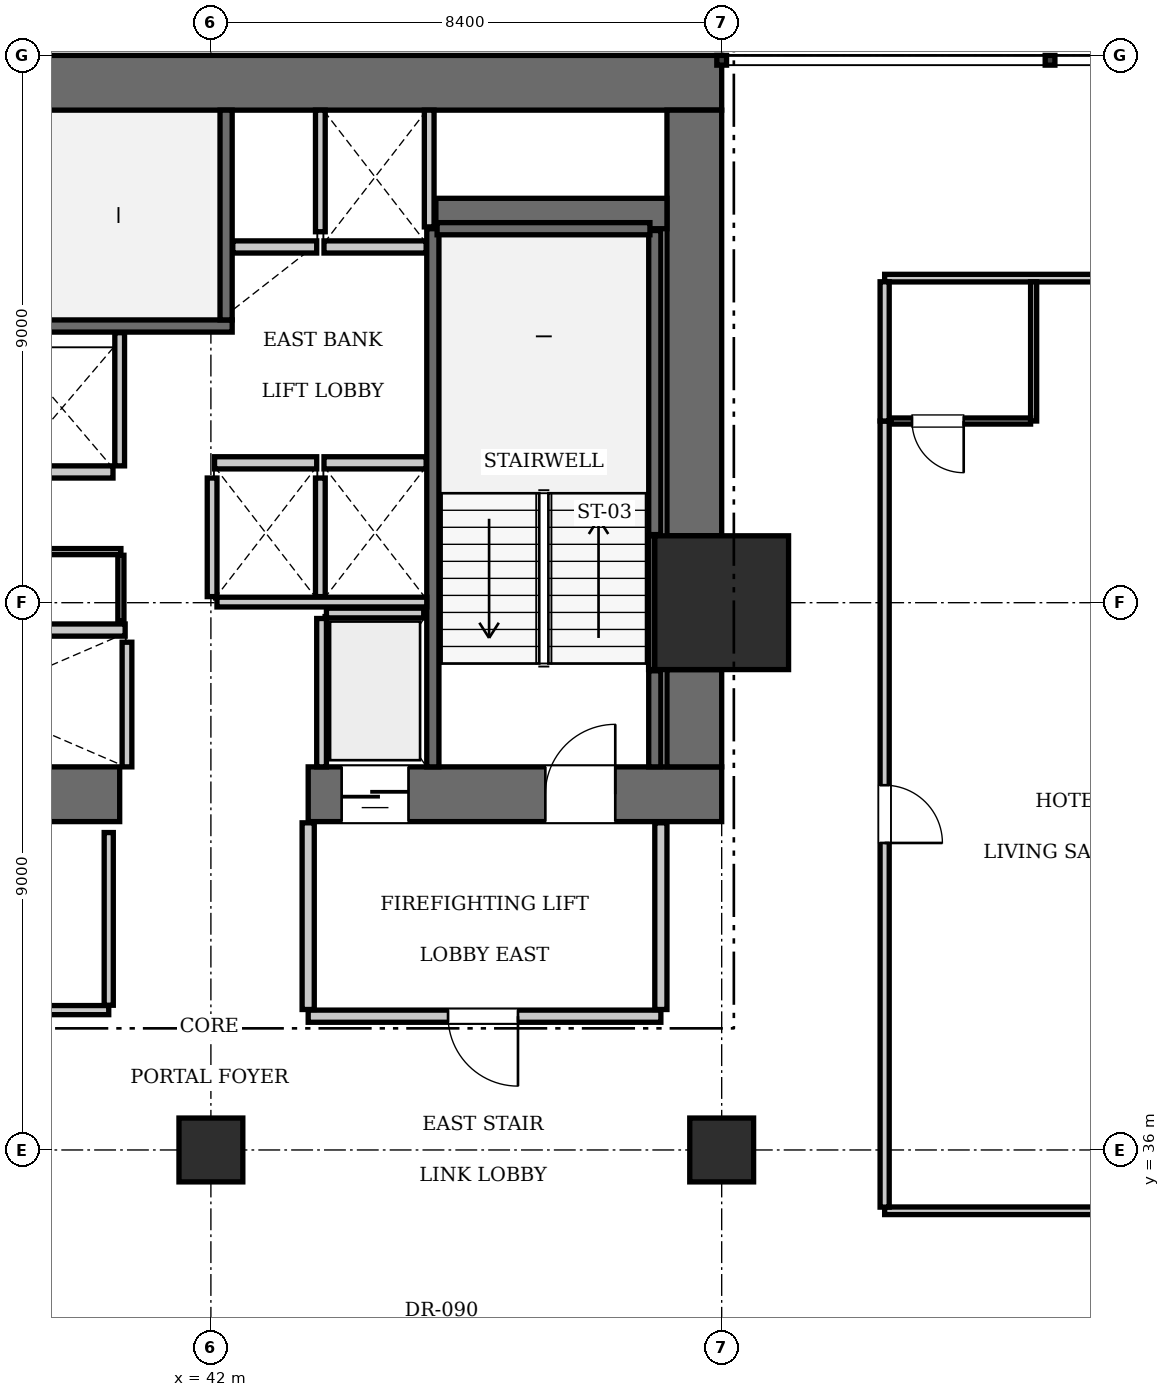
"""IFC4 building model, lengths in metres.
Left out: names, types, materials, properties, quantities, classifications, styles, units other than length and angle.
Written with IfcOpenShell. Run it as: python <this file> out.ifc"""

import sys

from ifc_helpers import new_model, si_unit, direction, frame, frame_2d, origin, origin_2d, place, context, subcontext, project, spatial, rectangle, extrude, element, fill, save


model = new_model("IFC4")
c1 = context("Model", 3, precision=1e-05, world=origin(), true_north=direction((0.0, 1.0)))
c2 = subcontext(c1, "Body", "Model", "MODEL_VIEW")
j1 = project(units=[si_unit("LENGTHUNIT", "METRE"), si_unit("PLANEANGLEUNIT", "RADIAN")], contexts=[c1])
p1 = place(None, origin())
s1 = spatial("IfcSite", under=j1, at=p1, CompositionType="ELEMENT")
p2 = place(p1, origin())
s2 = spatial("IfcBuilding", under=s1, at=p2, CompositionType="ELEMENT")
p3 = place(p2, frame((0.0, 0.0, 111.65)))
s3 = spatial("IfcBuildingStorey", under=s2, at=p3, CompositionType="ELEMENT", Elevation=111.65)
p4 = place(p3, frame((50.4, 45.0, 0.0), z_axis=(0.0, 0.0, 1.0), x_axis=(1.0, 0.0, 0.0)))
e1 = element("IfcColumn", 1, at=p4, inside=s3, PredefinedType="COLUMN", context=c2, shape_type="SweptSolid", body=[
    extrude(rectangle(XDim=2.2, YDim=2.2, at=origin_2d()), origin(), (0.0, 0.0, 1.0), 3.85),
])
p5 = place(p3, frame((25.2, 53.55, 0.0), z_axis=(0.0, 0.0, 1.0), x_axis=(1.0, 0.0, 0.0)))
e2 = element("IfcWall", 2, at=p5, inside=s3, PredefinedType="SHEAR", context=c2, shape_type="SweptSolid", body=[
    extrude(rectangle(XDim=25.2, YDim=0.9, at=frame_2d((12.6, 0.0))), origin(), (0.0, 0.0, 1.0), 3.85),
])
p6 = place(p3, frame((35.1, 41.85, 0.0), z_axis=(0.0, 0.0, 1.0), x_axis=(1.0, 0.0, 0.0)))
e3 = element("IfcWall", 3, at=p6, inside=s3, PredefinedType="SHEAR", context=c2, shape_type="SweptSolid", body=[
    extrude(rectangle(XDim=5.4, YDim=0.9, at=frame_2d((2.7, 0.0))), origin(), (0.0, 0.0, 1.0), 3.85),
])
p7 = place(p3, frame((43.6, 41.85, 0.0), z_axis=(0.0, 0.0, 1.0), x_axis=(1.0, 0.0, 0.0)))
e4 = element("IfcWall", 4, at=p7, inside=s3, PredefinedType="SHEAR", context=c2, shape_type="SweptSolid", body=[
    extrude(rectangle(XDim=6.8, YDim=0.9, at=frame_2d((3.4, 0.0))), origin(), (0.0, 0.0, 1.0), 3.85),
])
p8 = place(p7, frame((3.9, 0.0, 0.0)))
e5 = element("IfcOpeningElement", 5, at=p8, cuts=e4, PredefinedType="OPENING", context=c2, shape_type="SweptSolid", body=[
    extrude(rectangle(XDim=1.15, YDim=2.15, at=frame_2d((0.575, 1.075))), frame((0.0, 0.46, 0.0), z_axis=(0.0, -1.0, 0.0), x_axis=(1.0, 0.0, 0.0)), (0.0, 0.0, 1.0), 0.92),
])
p9 = place(p7, frame((0.55, 0.0, 0.0)))
e6 = element("IfcOpeningElement", 6, at=p9, cuts=e4, PredefinedType="OPENING", context=c2, shape_type="SweptSolid", body=[
    extrude(rectangle(XDim=1.1, YDim=2.2, at=frame_2d((0.55, 1.1))), frame((0.0, 0.46, 0.0), z_axis=(0.0, -1.0, 0.0), x_axis=(1.0, 0.0, 0.0)), (0.0, 0.0, 1.0), 0.92),
])
p10 = place(p3, frame((49.95, 42.3, 0.0), z_axis=(0.0, 0.0, 1.0), x_axis=(0.0, 1.0, 0.0)))
e7 = element("IfcWall", 7, at=p10, inside=s3, PredefinedType="SHEAR", context=c2, shape_type="SweptSolid", body=[
    extrude(rectangle(XDim=1.6, YDim=0.9, at=frame_2d((0.8, 0.0))), origin(), (0.0, 0.0, 1.0), 3.85),
])
p11 = place(p3, frame((49.95, 46.1, 0.0), z_axis=(0.0, 0.0, 1.0), x_axis=(0.0, 1.0, 0.0)))
e8 = element("IfcWall", 8, at=p11, inside=s3, PredefinedType="SHEAR", context=c2, shape_type="SweptSolid", body=[
    extrude(rectangle(XDim=7.0, YDim=0.9, at=frame_2d((3.5, 0.0))), origin(), (0.0, 0.0, 1.0), 3.85),
])
p12 = place(p3, frame((45.7, 51.4, 0.0), z_axis=(0.0, 0.0, 1.0), x_axis=(1.0, 0.0, 0.0)))
e9 = element("IfcWall", 9, at=p12, inside=s3, PredefinedType="SHEAR", context=c2, shape_type="SweptSolid", body=[
    extrude(rectangle(XDim=3.8, YDim=0.5, at=frame_2d((1.9, 0.0))), origin(), (0.0, 0.0, 1.0), 3.85),
])
for number, where, z_axis, x_axis in (
    (10, (42.0, 36.0, 0.0), (0.0, 0.0, 1.0), (1.0, 0.0, 0.0)),
    (11, (50.4, 36.0, 0.0), (0.0, 0.0, 1.0), (1.0, 0.0, 0.0)),
):
    element("IfcColumn", number, at=place(p3, frame(where, z_axis=z_axis, x_axis=x_axis)), inside=s3, PredefinedType="COLUMN", context=c2, shape_type="SweptSolid", body=[
        extrude(rectangle(XDim=1.05, YDim=1.05, at=origin_2d()), origin(), (0.0, 0.0, 1.0), 3.85),
    ])
p13 = place(p3, frame((33.25, 49.55, 0.0), z_axis=(0.0, 0.0, 1.0), x_axis=(1.0, 0.0, 0.0)))
e12 = element("IfcWall", 12, at=p13, inside=s3, PredefinedType="SOLIDWALL", context=c2, shape_type="SweptSolid", body=[
    extrude(rectangle(XDim=9.1, YDim=0.2, at=frame_2d((4.55, 0.0))), origin(), (0.0, 0.0, 1.0), 3.55),
])
p14 = place(p3, frame((42.25, 49.65, 0.0), z_axis=(0.0, 0.0, 1.0), x_axis=(0.0, 1.0, 0.0)))
e13 = element("IfcWall", 13, at=p14, inside=s3, PredefinedType="SOLIDWALL", context=c2, shape_type="SweptSolid", body=[
    extrude(rectangle(XDim=3.45, YDim=0.2, at=frame_2d((1.725, 0.0))), origin(), (0.0, 0.0, 1.0), 3.55),
])
p15 = place(p3, frame((45.65, 42.3, 0.0), z_axis=(0.0, 0.0, 1.0), x_axis=(0.0, 1.0, 0.0)))
e14 = element("IfcWall", 14, at=p15, inside=s3, PredefinedType="SOLIDWALL", context=c2, shape_type="SweptSolid", body=[
    extrude(rectangle(XDim=8.85, YDim=0.2, at=frame_2d((4.425, 0.0))), origin(), (0.0, 0.0, 1.0), 3.55),
])
p16 = place(p3, frame((49.3, 42.3, 0.0), z_axis=(0.0, 0.0, 1.0), x_axis=(0.0, 1.0, 0.0)))
e15 = element("IfcWall", 15, at=p16, inside=s3, PredefinedType="SOLIDWALL", context=c2, shape_type="SweptSolid", body=[
    extrude(rectangle(XDim=1.58, YDim=0.2, at=frame_2d((0.79, 0.0))), origin(), (0.0, 0.0, 1.0), 3.55),
])
p17 = place(p3, frame((49.3, 46.12, 0.0), z_axis=(0.0, 0.0, 1.0), x_axis=(0.0, 1.0, 0.0)))
e16 = element("IfcWall", 16, at=p17, inside=s3, PredefinedType="SOLIDWALL", context=c2, shape_type="SweptSolid", body=[
    extrude(rectangle(XDim=5.0, YDim=0.2, at=frame_2d((2.5, 0.0))), origin(), (0.0, 0.0, 1.0), 3.55),
])
p18 = place(p3, frame((45.72, 51.15, 0.0), z_axis=(0.0, 0.0, 1.0), x_axis=(1.0, 0.0, 0.0)))
e17 = element("IfcWall", 17, at=p18, inside=s3, PredefinedType="SOLIDWALL", context=c2, shape_type="SweptSolid", body=[
    extrude(rectangle(XDim=3.5, YDim=0.2, at=frame_2d((1.75, 0.0))), origin(), (0.0, 0.0, 1.0), 3.55),
])
p19 = place(p3, frame((49.248, 43.9, 0.0), z_axis=(0.0, 0.0, 1.0), x_axis=(0.0, 1.0, 0.0)))
e18 = element("IfcWall", 18, at=p19, inside=s3, PredefinedType="SOLIDWALL", context=c2, shape_type="SweptSolid", body=[
    extrude(rectangle(XDim=2.2, YDim=0.1, at=frame_2d((1.1, 0.0))), origin(), (0.0, 0.0, 1.0), 3.55),
])
for number, where, z_axis, x_axis in (
    (19, (42.06, 47.3, 0.0), (0.0, 0.0, 1.0), (1.0, 0.0, 0.0)),
    (20, (43.86, 47.3, 0.0), (0.0, 0.0, 1.0), (1.0, 0.0, 0.0)),
):
    element("IfcWall", number, at=place(p3, frame(where, z_axis=z_axis, x_axis=x_axis)), inside=s3, PredefinedType="SOLIDWALL", context=c2, shape_type="SweptSolid", body=[
        extrude(rectangle(XDim=1.68, YDim=0.2, at=frame_2d((0.84, 0.0))), origin(), (0.0, 0.0, 1.0), 3.55),
    ])
p20 = place(p3, frame((42.36, 50.85, 0.0), z_axis=(0.0, 0.0, 1.0), x_axis=(1.0, 0.0, 0.0)))
e21 = element("IfcWall", 21, at=p20, inside=s3, PredefinedType="SOLIDWALL", context=c2, shape_type="SweptSolid", body=[
    extrude(rectangle(XDim=1.38, YDim=0.2, at=frame_2d((0.69, 0.0))), origin(), (0.0, 0.0, 1.0), 3.55),
])
p21 = place(p3, frame((43.86, 50.85, 0.0), z_axis=(0.0, 0.0, 1.0), x_axis=(1.0, 0.0, 0.0)))
e22 = element("IfcWall", 22, at=p21, inside=s3, PredefinedType="SOLIDWALL", context=c2, shape_type="SweptSolid", body=[
    extrude(rectangle(XDim=1.68, YDim=0.2, at=frame_2d((0.84, 0.0))), origin(), (0.0, 0.0, 1.0), 3.55),
])
p22 = place(p3, frame((38.91, 44.55, 0.0), z_axis=(0.0, 0.0, 1.0), x_axis=(1.0, 0.0, 0.0)))
e23 = element("IfcWall", 23, at=p22, inside=s3, PredefinedType="SOLIDWALL", context=c2, shape_type="SweptSolid", body=[
    extrude(rectangle(XDim=1.68, YDim=0.2, at=frame_2d((0.84, 0.0))), origin(), (0.0, 0.0, 1.0), 3.55),
])
p23 = place(p3, frame((38.71, 47.15, 0.0), z_axis=(0.0, 0.0, 1.0), x_axis=(1.0, 0.0, 0.0)))
e24 = element("IfcWall", 24, at=p23, inside=s3, PredefinedType="SOLIDWALL", context=c2, shape_type="SweptSolid", body=[
    extrude(rectangle(XDim=1.68, YDim=0.2, at=frame_2d((0.84, 0.0))), origin(), (0.0, 0.0, 1.0), 3.55),
])
p24 = place(p3, frame((43.9, 44.83, 0.0), z_axis=(0.0, 0.0, 1.0), x_axis=(1.0, 0.0, 0.0)))
e25 = element("IfcWall", 25, at=p24, inside=s3, PredefinedType="SOLIDWALL", context=c2, shape_type="SweptSolid", body=[
    extrude(rectangle(XDim=1.6, YDim=0.16, at=frame_2d((0.8, 0.0))), origin(), (0.0, 0.0, 1.0), 3.55),
])
p25 = place(p3, frame((43.82, 42.3, 0.0), z_axis=(0.0, 0.0, 1.0), x_axis=(0.0, 1.0, 0.0)))
e26 = element("IfcWall", 26, at=p25, inside=s3, PredefinedType="SOLIDWALL", context=c2, shape_type="SweptSolid", body=[
    extrude(rectangle(XDim=2.44, YDim=0.16, at=frame_2d((1.22, 0.0))), origin(), (0.0, 0.0, 1.0), 3.55),
])
for number, where, z_axis, x_axis in (
    (27, (42.02, 45.1, 0.0), (0.0, 0.0, 1.0), (0.0, 1.0, 0.0)),
    (28, (43.8, 45.1, 0.0), (0.0, 0.0, 1.0), (0.0, 1.0, 0.0)),
):
    element("IfcWall", number, at=place(p3, frame(where, z_axis=z_axis, x_axis=x_axis)), inside=s3, PredefinedType="SOLIDWALL", context=c2, shape_type="SweptSolid", body=[
        extrude(rectangle(XDim=1.95, YDim=0.16, at=frame_2d((0.975, 0.0))), origin(), (0.0, 0.0, 1.0), 3.55),
    ])
p26 = place(p3, frame((42.1, 45.01, 0.0), z_axis=(0.0, 0.0, 1.0), x_axis=(1.0, 0.0, 0.0)))
e29 = element("IfcWall", 29, at=p26, inside=s3, PredefinedType="SOLIDWALL", context=c2, shape_type="SweptSolid", body=[
    extrude(rectangle(XDim=3.45, YDim=0.16, at=frame_2d((1.725, 0.0))), origin(), (0.0, 0.0, 1.0), 3.55),
])
p27 = place(p3, frame((45.59, 51.18, 0.0), z_axis=(0.0, 0.0, 1.0), x_axis=(0.0, 1.0, 0.0)))
e30 = element("IfcWall", 30, at=p27, inside=s3, PredefinedType="SOLIDWALL", context=c2, shape_type="SweptSolid", body=[
    extrude(rectangle(XDim=1.92, YDim=0.16, at=frame_2d((0.96, 0.0))), origin(), (0.0, 0.0, 1.0), 3.55),
])
p28 = place(p3, frame((43.8, 51.1, 0.0), z_axis=(0.0, 0.0, 1.0), x_axis=(0.0, 1.0, 0.0)))
e31 = element("IfcWall", 31, at=p28, inside=s3, PredefinedType="SOLIDWALL", context=c2, shape_type="SweptSolid", body=[
    extrude(rectangle(XDim=2.0, YDim=0.16, at=frame_2d((1.0, 0.0))), origin(), (0.0, 0.0, 1.0), 3.55),
])
p29 = place(p3, frame((40.62, 42.3, 0.0), z_axis=(0.0, 0.0, 1.0), x_axis=(0.0, 1.0, 0.0)))
e32 = element("IfcWall", 32, at=p29, inside=s3, PredefinedType="SOLIDWALL", context=c2, shape_type="SweptSolid", body=[
    extrude(rectangle(XDim=2.05, YDim=0.16, at=frame_2d((1.025, 0.0))), origin(), (0.0, 0.0, 1.0), 3.55),
])
p30 = place(p3, frame((40.5, 47.25, 0.0), z_axis=(0.0, 0.0, 1.0), x_axis=(0.0, 1.0, 0.0)))
e33 = element("IfcWall", 33, at=p30, inside=s3, PredefinedType="SOLIDWALL", context=c2, shape_type="SweptSolid", body=[
    extrude(rectangle(XDim=2.19, YDim=0.16, at=frame_2d((1.095, 0.0))), origin(), (0.0, 0.0, 1.0), 3.55),
])
p31 = place(p3, frame((43.6, 38.2, 0.0), z_axis=(0.0, 0.0, 1.0), x_axis=(1.0, 0.0, 0.0)))
e34 = element("IfcWall", 34, at=p31, inside=s3, PredefinedType="PARTITIONING", context=c2, shape_type="SweptSolid", body=[
    extrude(rectangle(XDim=5.8, YDim=0.2, at=frame_2d((2.9, 0.0))), origin(), (0.0, 0.0, 1.0), 3.55),
])
p32 = place(p31, frame((2.3, 0.0, 0.0)))
e35 = element("IfcOpeningElement", 35, at=p32, cuts=e34, PredefinedType="OPENING", context=c2, shape_type="SweptSolid", body=[
    extrude(rectangle(XDim=1.15, YDim=2.15, at=frame_2d((0.575, 1.075))), frame((0.0, 0.11, 0.0), z_axis=(0.0, -1.0, 0.0), x_axis=(1.0, 0.0, 0.0)), (0.0, 0.0, 1.0), 0.22),
])
for number, where, z_axis, x_axis in (
    (36, (43.6, 38.31, 0.0), (0.0, 0.0, 1.0), (0.0, 1.0, 0.0)),
    (37, (49.4, 38.31, 0.0), (0.0, 0.0, 1.0), (0.0, 1.0, 0.0)),
):
    element("IfcWall", number, at=place(p3, frame(where, z_axis=z_axis, x_axis=x_axis)), inside=s3, PredefinedType="PARTITIONING", context=c2, shape_type="SweptSolid", body=[
        extrude(rectangle(XDim=3.07, YDim=0.2, at=frame_2d((1.535, 0.0))), origin(), (0.0, 0.0, 1.0), 3.55),
    ])
p33 = place(p3, frame((35.58, 45.84, 0.0), z_axis=(0.0, 0.0, 1.0), x_axis=(1.0, 0.0, 0.0)))
e38 = element("IfcWall", 38, at=p33, inside=s3, PredefinedType="PARTITIONING", context=c2, shape_type="SweptSolid", body=[
    extrude(rectangle(XDim=4.94, YDim=0.1, at=frame_2d((2.47, 0.0))), origin(), (0.0, 0.0, 1.0), 3.55),
])
p34 = place(p33, frame((1.8, 0.0, 0.0)))
e39 = element("IfcOpeningElement", 39, at=p34, cuts=e38, PredefinedType="OPENING", context=c2, shape_type="SweptSolid", body=[
    extrude(rectangle(XDim=0.8, YDim=2.05, at=frame_2d((0.4, 1.025))), frame((0.0, 0.06, 0.0), z_axis=(0.0, -1.0, 0.0), x_axis=(1.0, 0.0, 0.0)), (0.0, 0.0, 1.0), 0.12),
])
p35 = place(p3, frame((40.52, 44.7, 0.0), z_axis=(0.0, 0.0, 1.0), x_axis=(0.0, 1.0, 0.0)))
e40 = element("IfcWall", 40, at=p35, inside=s3, PredefinedType="PARTITIONING", context=c2, shape_type="SweptSolid", body=[
    extrude(rectangle(XDim=1.08, YDim=0.1, at=frame_2d((0.54, 0.0))), origin(), (0.0, 0.0, 1.0), 3.55),
])
p36 = place(p3, frame((34.4, 38.3, 0.0), z_axis=(0.0, 0.0, 1.0), x_axis=(1.0, 0.0, 0.0)))
e41 = element("IfcWall", 41, at=p36, inside=s3, PredefinedType="PARTITIONING", context=c2, shape_type="SweptSolid", body=[
    extrude(rectangle(XDim=5.92, YDim=0.15, at=frame_2d((2.96, 0.0))), origin(), (0.0, 0.0, 1.0), 3.55),
])
p37 = place(p36, frame((2.4, 0.0, 0.0)))
e42 = element("IfcOpeningElement", 42, at=p37, cuts=e41, PredefinedType="OPENING", context=c2, shape_type="SweptSolid", body=[
    extrude(rectangle(XDim=0.9, YDim=2.1, at=frame_2d((0.45, 1.05))), frame((0.0, 0.085, 0.0), z_axis=(0.0, -1.0, 0.0), x_axis=(1.0, 0.0, 0.0)), (0.0, 0.0, 1.0), 0.17),
])
p38 = place(p3, frame((40.32, 38.38, 0.0), z_axis=(0.0, 0.0, 1.0), x_axis=(0.0, 1.0, 0.0)))
e43 = element("IfcWall", 43, at=p38, inside=s3, PredefinedType="PARTITIONING", context=c2, shape_type="SweptSolid", body=[
    extrude(rectangle(XDim=2.84, YDim=0.15, at=frame_2d((1.42, 0.0))), origin(), (0.0, 0.0, 1.0), 3.55),
])
p39 = place(p3, frame((53.08, 35.0, 0.0), z_axis=(0.0, 0.0, 1.0), x_axis=(1.0, 0.0, 0.0)))
e44 = element("IfcWall", 44, at=p39, inside=s3, PredefinedType="PARTITIONING", context=c2, shape_type="SweptSolid", body=[
    extrude(rectangle(XDim=11.62, YDim=0.125, at=frame_2d((5.81, 0.0))), origin(), (0.0, 0.0, 1.0), 3.55),
])
p40 = place(p3, frame((53.08, 50.337, 0.0), z_axis=(0.0, 0.0, 1.0), x_axis=(1.0, 0.0, 0.0)))
e45 = element("IfcWall", 45, at=p40, inside=s3, PredefinedType="PARTITIONING", context=c2, shape_type="SweptSolid", body=[
    extrude(rectangle(XDim=8.38, YDim=0.125, at=frame_2d((4.19, 0.0))), origin(), (0.0, 0.0, 1.0), 3.55),
])
p41 = place(p3, frame((53.08, 35.06, 0.0), z_axis=(0.0, 0.0, 1.0), x_axis=(0.0, 1.0, 0.0)))
e46 = element("IfcWall", 46, at=p41, inside=s3, PredefinedType="PARTITIONING", context=c2, shape_type="SweptSolid", body=[
    extrude(rectangle(XDim=12.927, YDim=0.15, at=frame_2d((6.464, 0.0))), origin(), (0.0, 0.0, 1.0), 3.55),
])
p42 = place(p41, frame((5.989, 0.0, 0.0)))
e47 = element("IfcOpeningElement", 47, at=p42, cuts=e46, PredefinedType="OPENING", context=c2, shape_type="SweptSolid", body=[
    extrude(rectangle(XDim=0.95, YDim=2.15, at=frame_2d((0.475, 1.075))), frame((0.0, 0.085, 0.0), z_axis=(0.0, -1.0, 0.0), x_axis=(1.0, 0.0, 0.0)), (0.0, 0.0, 1.0), 0.17),
])
p43 = place(p3, frame((53.08, 47.988, 0.0), z_axis=(0.0, 0.0, 1.0), x_axis=(0.0, 1.0, 0.0)))
e48 = element("IfcWall", 48, at=p43, inside=s3, PredefinedType="PARTITIONING", context=c2, shape_type="SweptSolid", body=[
    extrude(rectangle(XDim=2.29, YDim=0.15, at=frame_2d((1.145, 0.0))), origin(), (0.0, 0.0, 1.0), 3.55),
])
p44 = place(p3, frame((55.53, 47.988, 0.0), z_axis=(0.0, 0.0, 1.0), x_axis=(0.0, 1.0, 0.0)))
e49 = element("IfcWall", 49, at=p44, inside=s3, PredefinedType="PARTITIONING", context=c2, shape_type="SweptSolid", body=[
    extrude(rectangle(XDim=2.29, YDim=0.1, at=frame_2d((1.145, 0.0))), origin(), (0.0, 0.0, 1.0), 3.55),
])
p45 = place(p3, frame((53.18, 47.988, 0.0), z_axis=(0.0, 0.0, 1.0), x_axis=(1.0, 0.0, 0.0)))
e50 = element("IfcWall", 50, at=p45, inside=s3, PredefinedType="PARTITIONING", context=c2, shape_type="SweptSolid", body=[
    extrude(rectangle(XDim=2.3, YDim=0.1, at=frame_2d((1.15, 0.0))), origin(), (0.0, 0.0, 1.0), 3.55),
])
p46 = place(p45, frame((0.35, 0.0, 0.0)))
e51 = element("IfcOpeningElement", 51, at=p46, cuts=e50, PredefinedType="OPENING", context=c2, shape_type="SweptSolid", body=[
    extrude(rectangle(XDim=0.85, YDim=2.1, at=frame_2d((0.425, 1.05))), frame((0.0, 0.06, 0.0), z_axis=(0.0, -1.0, 0.0), x_axis=(1.0, 0.0, 0.0)), (0.0, 0.0, 1.0), 0.12),
])
p47 = place(p8, origin())
e52 = element("IfcDoor", 52, at=p47, inside=s3, OperationType="SINGLE_SWING_RIGHT", PredefinedType="DOOR", context=c2, shape_type="SweptSolid", body=[
    extrude(rectangle(XDim=1.15, YDim=2.15, at=frame_2d((0.575, 1.075))), frame((0.0, 0.025, 0.0), z_axis=(0.0, -1.0, 0.0), x_axis=(1.0, 0.0, 0.0)), (0.0, 0.0, 1.0), 0.05),
])
fill(e5, e52)
p48 = place(p9, frame((1.1, 0.0, 0.0), z_axis=(0.0, 0.0, 1.0), x_axis=(-1.0, 0.0, 0.0)))
e53 = element("IfcDoor", 53, at=p48, inside=s3, OperationType="SLIDING_TO_LEFT", PredefinedType="DOOR", context=c2, shape_type="SweptSolid", body=[
    extrude(rectangle(XDim=1.1, YDim=2.2, at=frame_2d((0.55, 1.1))), frame((0.0, 0.025, 0.0), z_axis=(0.0, -1.0, 0.0), x_axis=(1.0, 0.0, 0.0)), (0.0, 0.0, 1.0), 0.05),
])
fill(e6, e53)
p49 = place(p32, frame((1.15, 0.0, 0.0), z_axis=(0.0, 0.0, 1.0), x_axis=(-1.0, 0.0, 0.0)))
e54 = element("IfcDoor", 54, at=p49, inside=s3, OperationType="SINGLE_SWING_LEFT", PredefinedType="DOOR", context=c2, shape_type="SweptSolid", body=[
    extrude(rectangle(XDim=1.15, YDim=2.15, at=frame_2d((0.575, 1.075))), frame((0.0, 0.025, 0.0), z_axis=(0.0, -1.0, 0.0), x_axis=(1.0, 0.0, 0.0)), (0.0, 0.0, 1.0), 0.05),
])
fill(e35, e54)
p50 = place(p46, frame((0.85, 0.0, 0.0), z_axis=(0.0, 0.0, 1.0), x_axis=(-1.0, 0.0, 0.0)))
e55 = element("IfcDoor", 55, at=p50, inside=s3, OperationType="SINGLE_SWING_LEFT", PredefinedType="DOOR", context=c2, shape_type="SweptSolid", body=[
    extrude(rectangle(XDim=0.85, YDim=2.1, at=frame_2d((0.425, 1.05))), frame((0.0, 0.025, 0.0), z_axis=(0.0, -1.0, 0.0), x_axis=(1.0, 0.0, 0.0)), (0.0, 0.0, 1.0), 0.05),
])
fill(e51, e55)
p51 = place(p42, frame((0.95, 0.0, 0.0), z_axis=(0.0, 0.0, 1.0), x_axis=(-1.0, 0.0, 0.0)))
e56 = element("IfcDoor", 56, at=p51, inside=s3, OperationType="SINGLE_SWING_RIGHT", PredefinedType="DOOR", context=c2, shape_type="SweptSolid", body=[
    extrude(rectangle(XDim=0.95, YDim=2.15, at=frame_2d((0.475, 1.075))), frame((0.0, 0.025, 0.0), z_axis=(0.0, -1.0, 0.0), x_axis=(1.0, 0.0, 0.0)), (0.0, 0.0, 1.0), 0.05),
])
fill(e47, e56)
save(model, sys.argv[1])
